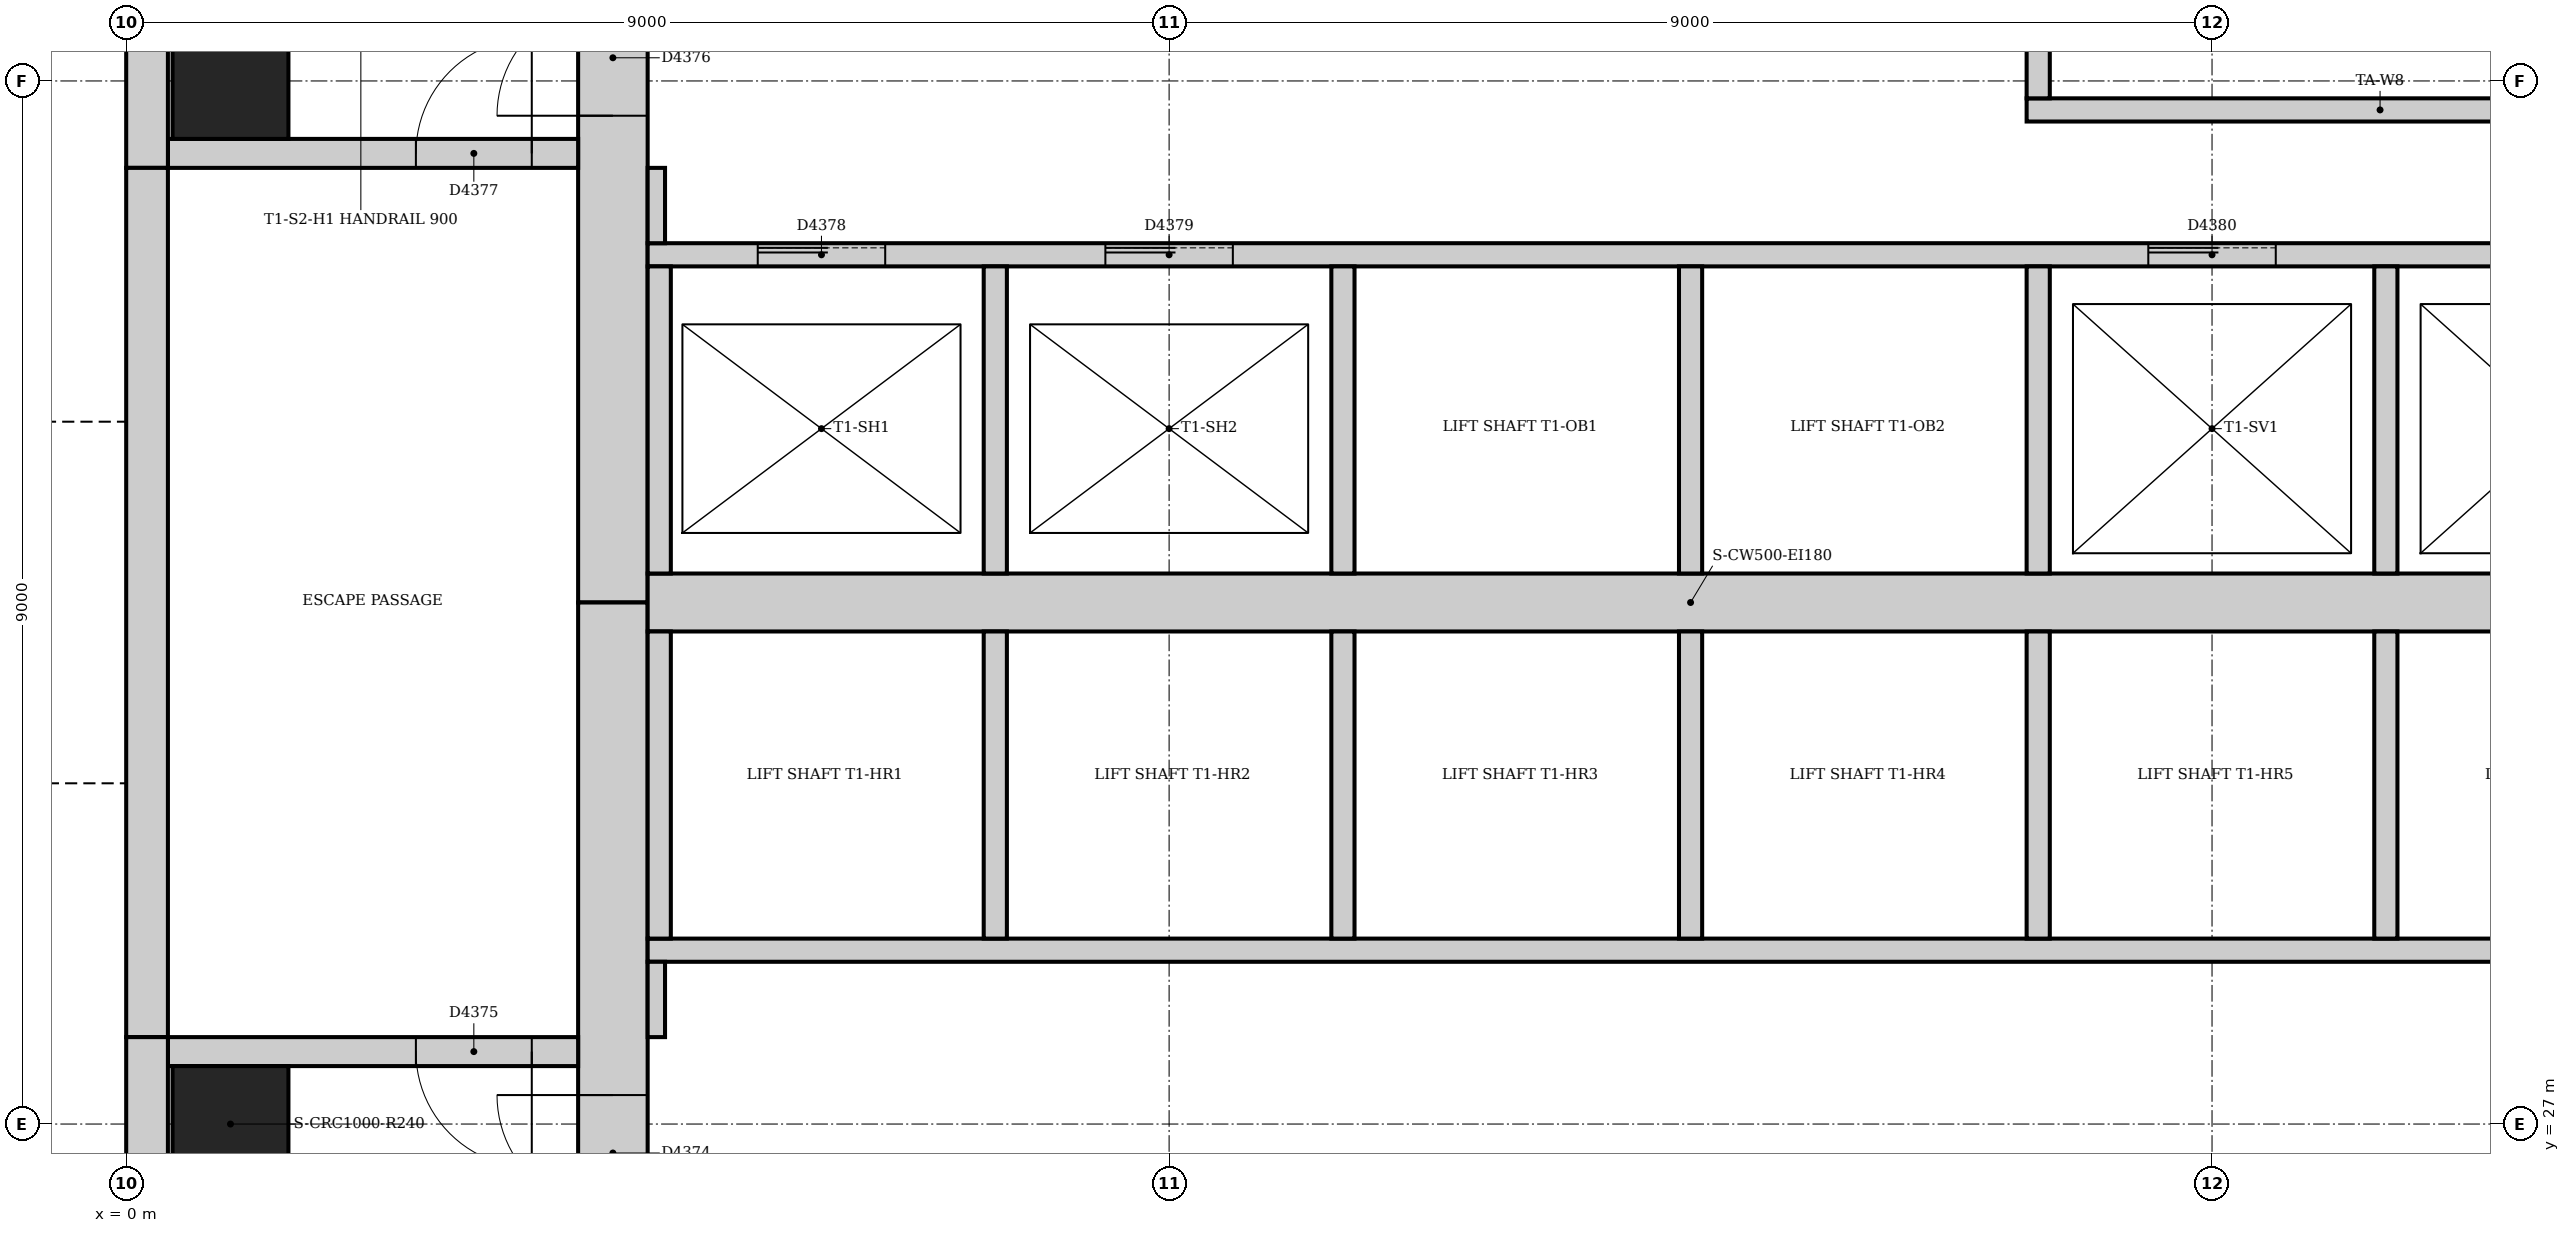
"""IFC4 building model, lengths in metres.
Left out: names, types, materials, properties, quantities, classifications, styles, units other than length and angle.
Written with IfcOpenShell. Run it as: python <this file> out.ifc"""

import sys

from ifc_helpers import new_model, si_unit, direction, frame, frame_2d, origin, origin_2d, place, context, subcontext, project, spatial, rectangle, extrude, element, fill, save


model = new_model("IFC4")
c1 = context("Model", 3, precision=1e-05, world=origin(), true_north=direction((0.0, 1.0)))
c2 = subcontext(c1, "Body", "Model", "MODEL_VIEW")
j1 = project(units=[si_unit("LENGTHUNIT", "METRE"), si_unit("PLANEANGLEUNIT", "RADIAN")], contexts=[c1])
p1 = place(None, origin())
s1 = spatial("IfcSite", under=j1, at=p1, CompositionType="ELEMENT")
p2 = place(p1, origin())
s2 = spatial("IfcBuilding", under=s1, at=p2, CompositionType="ELEMENT")
p3 = place(p2, frame((0.0, 0.0, 144.0)))
s3 = spatial("IfcBuildingStorey", under=s2, at=p3, CompositionType="ELEMENT", Elevation=144.0)
p4 = place(p3, frame((4.2, 42.0, 0.0), z_axis=(0.0, 0.0, 1.0), x_axis=(0.0, -1.0, 0.0)))
e1 = element("IfcWall", 1, at=p4, inside=s3, PredefinedType="SOLIDWALL", context=c2, shape_type="SweptSolid", body=[
    extrude(rectangle(XDim=10.5, YDim=0.6, at=frame_2d((5.25, 0.0))), origin(), (0.0, 0.0, 1.0), 5.0),
])
p5 = place(p4, frame((5.3, 0.0, 0.0)))
e2 = element("IfcOpeningElement", 2, at=p5, cuts=e1, PredefinedType="OPENING", context=c2, shape_type="SweptSolid", body=[
    extrude(rectangle(XDim=1.0, YDim=2.1, at=frame_2d((0.5, 1.05))), frame((0.0, 0.31, 0.0), z_axis=(0.0, -1.0, 0.0), x_axis=(1.0, 0.0, 0.0)), (0.0, 0.0, 1.0), 0.62),
])
p6 = place(p3, frame((4.2, 31.5, 0.0), z_axis=(0.0, 0.0, 1.0), x_axis=(0.0, -1.0, 0.0)))
e3 = element("IfcWall", 3, at=p6, inside=s3, PredefinedType="SOLIDWALL", context=c2, shape_type="SweptSolid", body=[
    extrude(rectangle(XDim=10.5, YDim=0.6, at=frame_2d((5.25, 0.0))), origin(), (0.0, 0.0, 1.0), 5.0),
])
p7 = place(p6, frame((4.25, 0.0, 0.0)))
e4 = element("IfcOpeningElement", 4, at=p7, cuts=e3, PredefinedType="OPENING", context=c2, shape_type="SweptSolid", body=[
    extrude(rectangle(XDim=1.0, YDim=2.1, at=frame_2d((0.5, 1.05))), frame((0.0, 0.31, 0.0), z_axis=(0.0, -1.0, 0.0), x_axis=(1.0, 0.0, 0.0)), (0.0, 0.0, 1.0), 0.62),
])
p8 = place(p3, frame((4.5, 31.5, 0.0), z_axis=(0.0, 0.0, 1.0), x_axis=(1.0, 0.0, 0.0)))
e5 = element("IfcWall", 5, at=p8, inside=s3, PredefinedType="SOLIDWALL", context=c2, shape_type="SweptSolid", body=[
    extrude(rectangle(XDim=18.0, YDim=0.5, at=frame_2d((9.0, 0.0))), origin(), (0.0, 0.0, 1.0), 5.0),
])
p9 = place(p3, frame((3.9, 27.625, 0.0), z_axis=(0.0, 0.0, 1.0), x_axis=(-1.0, 0.0, 0.0)))
e6 = element("IfcWall", 6, at=p9, inside=s3, PredefinedType="SOLIDWALL", context=c2, shape_type="SweptSolid", body=[
    extrude(rectangle(XDim=3.54, YDim=0.25, at=frame_2d((1.77, 0.0))), origin(), (0.0, 0.0, 1.0), 5.0),
])
p10 = place(p9, frame((0.4, 0.0, 0.0)))
e7 = element("IfcOpeningElement", 7, at=p10, cuts=e6, PredefinedType="OPENING", context=c2, shape_type="SweptSolid", body=[
    extrude(rectangle(XDim=1.0, YDim=2.1, at=frame_2d((0.5, 1.05))), frame((0.0, 0.135, 0.0), z_axis=(0.0, -1.0, 0.0), x_axis=(1.0, 0.0, 0.0)), (0.0, 0.0, 1.0), 0.27),
])
p11 = place(p3, frame((0.36, 35.375, 0.0), z_axis=(0.0, 0.0, 1.0), x_axis=(1.0, 0.0, 0.0)))
e8 = element("IfcWall", 8, at=p11, inside=s3, PredefinedType="SOLIDWALL", context=c2, shape_type="SweptSolid", body=[
    extrude(rectangle(XDim=3.54, YDim=0.25, at=frame_2d((1.77, 0.0))), origin(), (0.0, 0.0, 1.0), 5.0),
])
p12 = place(p11, frame((2.14, 0.0, 0.0)))
e9 = element("IfcOpeningElement", 9, at=p12, cuts=e8, PredefinedType="OPENING", context=c2, shape_type="SweptSolid", body=[
    extrude(rectangle(XDim=1.0, YDim=2.1, at=frame_2d((0.5, 1.05))), frame((0.0, 0.135, 0.0), z_axis=(0.0, -1.0, 0.0), x_axis=(1.0, 0.0, 0.0)), (0.0, 0.0, 1.0), 0.27),
])
for number, where, z_axis, x_axis in (
    (10, (0.9, 27.0, 0.0), (0.0, 0.0, 1.0), (1.0, 0.0, 0.0)),
    (11, (0.9, 36.0, 0.0), (0.0, 0.0, 1.0), (1.0, 0.0, 0.0)),
):
    element("IfcColumn", number, at=place(p3, frame(where, z_axis=z_axis, x_axis=x_axis)), inside=s3, PredefinedType="COLUMN", context=c2, shape_type="SweptSolid", body=[
        extrude(rectangle(XDim=1.0, YDim=1.0, at=origin_2d()), origin(), (0.0, 0.0, 1.0), 5.0),
    ])
p13 = place(p3, frame((0.18, 42.0, 0.0), z_axis=(0.0, 0.0, 1.0), x_axis=(0.0, -1.0, 0.0)))
e12 = element("IfcWall", 12, at=p13, inside=s3, PredefinedType="STANDARD", context=c2, shape_type="SweptSolid", body=[
    extrude(rectangle(XDim=6.75, YDim=0.36, at=frame_2d((3.375, 0.0))), origin(), (0.0, 0.0, 1.0), 4.85),
])
p14 = place(p3, frame((0.18, 35.25, 0.0), z_axis=(0.0, 0.0, 1.0), x_axis=(0.0, -1.0, 0.0)))
e13 = element("IfcWall", 13, at=p14, inside=s3, PredefinedType="STANDARD", context=c2, shape_type="SweptSolid", body=[
    extrude(rectangle(XDim=7.5, YDim=0.36, at=frame_2d((3.75, 0.0))), origin(), (0.0, 0.0, 1.0), 4.85),
])
p15 = place(p3, frame((0.18, 27.75, 0.0), z_axis=(0.0, 0.0, 1.0), x_axis=(0.0, -1.0, 0.0)))
e14 = element("IfcWall", 14, at=p15, inside=s3, PredefinedType="STANDARD", context=c2, shape_type="SweptSolid", body=[
    extrude(rectangle(XDim=6.75, YDim=0.36, at=frame_2d((3.375, 0.0))), origin(), (0.0, 0.0, 1.0), 4.85),
])
p16 = place(p3, frame((16.4, 35.75, 0.0), z_axis=(0.0, 0.0, 1.0), x_axis=(1.0, 0.0, 0.0)))
e15 = element("IfcWall", 15, at=p16, inside=s3, PredefinedType="PARTITIONING", context=c2, shape_type="SweptSolid", body=[
    extrude(rectangle(XDim=6.1, YDim=0.2, at=frame_2d((3.05, 0.0))), origin(), (0.0, 0.0, 1.0), 4.85),
])
p17 = place(p3, frame((16.5, 35.85, 0.0), z_axis=(0.0, 0.0, 1.0), x_axis=(0.0, 1.0, 0.0)))
e16 = element("IfcWall", 16, at=p17, inside=s3, PredefinedType="PARTITIONING", context=c2, shape_type="SweptSolid", body=[
    extrude(rectangle(XDim=2.55, YDim=0.2, at=frame_2d((1.275, 0.0))), origin(), (0.0, 0.0, 1.0), 4.85),
])
p18 = place(p3, frame((4.5, 28.5, 0.0), z_axis=(0.0, 0.0, 1.0), x_axis=(1.0, 0.0, 0.0)))
e17 = element("IfcWall", 17, at=p18, inside=s3, PredefinedType="PARTITIONING", context=c2, shape_type="SweptSolid", body=[
    extrude(rectangle(XDim=18.0, YDim=0.2, at=frame_2d((9.0, 0.0))), origin(), (0.0, 0.0, 1.0), 4.85),
])
p19 = place(p3, frame((4.5, 34.5, 0.0), z_axis=(0.0, 0.0, 1.0), x_axis=(1.0, 0.0, 0.0)))
e18 = element("IfcWall", 18, at=p19, inside=s3, PredefinedType="PARTITIONING", context=c2, shape_type="SweptSolid", body=[
    extrude(rectangle(XDim=18.0, YDim=0.2, at=frame_2d((9.0, 0.0))), origin(), (0.0, 0.0, 1.0), 4.85),
])
p20 = place(p19, frame((0.95, 0.0, 0.0)))
e19 = element("IfcOpeningElement", 19, at=p20, cuts=e18, PredefinedType="OPENING", context=c2, shape_type="SweptSolid", body=[
    extrude(rectangle(XDim=1.1, YDim=2.1, at=frame_2d((0.55, 1.05))), frame((0.0, 0.11, 0.0), z_axis=(0.0, -1.0, 0.0), x_axis=(1.0, 0.0, 0.0)), (0.0, 0.0, 1.0), 0.22),
])
p21 = place(p19, frame((3.95, 0.0, 0.0)))
e20 = element("IfcOpeningElement", 20, at=p21, cuts=e18, PredefinedType="OPENING", context=c2, shape_type="SweptSolid", body=[
    extrude(rectangle(XDim=1.1, YDim=2.1, at=frame_2d((0.55, 1.05))), frame((0.0, 0.11, 0.0), z_axis=(0.0, -1.0, 0.0), x_axis=(1.0, 0.0, 0.0)), (0.0, 0.0, 1.0), 0.22),
])
p22 = place(p19, frame((12.95, 0.0, 0.0)))
e21 = element("IfcOpeningElement", 21, at=p22, cuts=e18, PredefinedType="OPENING", context=c2, shape_type="SweptSolid", body=[
    extrude(rectangle(XDim=1.1, YDim=2.1, at=frame_2d((0.55, 1.05))), frame((0.0, 0.11, 0.0), z_axis=(0.0, -1.0, 0.0), x_axis=(1.0, 0.0, 0.0)), (0.0, 0.0, 1.0), 0.22),
])
p23 = place(p19, frame((15.95, 0.0, 0.0)))
e22 = element("IfcOpeningElement", 22, at=p23, cuts=e18, PredefinedType="OPENING", context=c2, shape_type="SweptSolid", body=[
    extrude(rectangle(XDim=1.1, YDim=2.1, at=frame_2d((0.55, 1.05))), frame((0.0, 0.11, 0.0), z_axis=(0.0, -1.0, 0.0), x_axis=(1.0, 0.0, 0.0)), (0.0, 0.0, 1.0), 0.22),
])
for number, where, z_axis, x_axis in (
    (23, (4.6, 31.75, 0.0), (0.0, 0.0, 1.0), (0.0, 1.0, 0.0)),
    (24, (4.6, 28.6, 0.0), (0.0, 0.0, 1.0), (0.0, 1.0, 0.0)),
    (25, (7.5, 28.6, 0.0), (0.0, 0.0, 1.0), (0.0, 1.0, 0.0)),
    (26, (7.5, 31.75, 0.0), (0.0, 0.0, 1.0), (0.0, 1.0, 0.0)),
    (27, (10.5, 28.6, 0.0), (0.0, 0.0, 1.0), (0.0, 1.0, 0.0)),
    (28, (10.5, 31.75, 0.0), (0.0, 0.0, 1.0), (0.0, 1.0, 0.0)),
    (29, (13.5, 28.6, 0.0), (0.0, 0.0, 1.0), (0.0, 1.0, 0.0)),
    (30, (13.5, 31.75, 0.0), (0.0, 0.0, 1.0), (0.0, 1.0, 0.0)),
    (31, (16.5, 28.6, 0.0), (0.0, 0.0, 1.0), (0.0, 1.0, 0.0)),
    (32, (16.5, 31.75, 0.0), (0.0, 0.0, 1.0), (0.0, 1.0, 0.0)),
    (33, (19.5, 28.6, 0.0), (0.0, 0.0, 1.0), (0.0, 1.0, 0.0)),
    (34, (19.5, 31.75, 0.0), (0.0, 0.0, 1.0), (0.0, 1.0, 0.0)),
):
    element("IfcWall", number, at=place(p3, frame(where, z_axis=z_axis, x_axis=x_axis)), inside=s3, PredefinedType="PARTITIONING", context=c2, shape_type="SweptSolid", body=[
        extrude(rectangle(XDim=2.65, YDim=0.2, at=frame_2d((1.325, 0.0))), origin(), (0.0, 0.0, 1.0), 4.85),
    ])
for number, where, z_axis, x_axis in (
    (35, (4.575, 27.75, 0.0), (0.0, 0.0, 1.0), (0.0, 1.0, 0.0)),
    (36, (4.575, 34.6, 0.0), (0.0, 0.0, 1.0), (0.0, 1.0, 0.0)),
):
    element("IfcWall", number, at=place(p3, frame(where, z_axis=z_axis, x_axis=x_axis)), inside=s3, PredefinedType="PARTITIONING", context=c2, shape_type="SweptSolid", body=[
        extrude(rectangle(XDim=0.65, YDim=0.15, at=frame_2d((0.325, 0.0))), origin(), (0.0, 0.0, 1.0), 4.85),
    ])
p24 = place(p7, frame((1.0, 0.0, 0.0), z_axis=(0.0, 0.0, 1.0), x_axis=(-1.0, 0.0, 0.0)))
e37 = element("IfcDoor", 37, at=p24, inside=s3, OperationType="SINGLE_SWING_RIGHT", PredefinedType="DOOR", context=c2, shape_type="SweptSolid", body=[
    extrude(rectangle(XDim=1.0, YDim=2.1, at=frame_2d((0.5, 1.05))), frame((0.0, 0.025, 0.0), z_axis=(0.0, -1.0, 0.0), x_axis=(1.0, 0.0, 0.0)), (0.0, 0.0, 1.0), 0.05),
])
fill(e4, e37)
p25 = place(p10, origin())
e38 = element("IfcDoor", 38, at=p25, inside=s3, OperationType="SINGLE_SWING_LEFT", PredefinedType="DOOR", context=c2, shape_type="SweptSolid", body=[
    extrude(rectangle(XDim=1.0, YDim=2.1, at=frame_2d((0.5, 1.05))), frame((0.0, 0.025, 0.0), z_axis=(0.0, -1.0, 0.0), x_axis=(1.0, 0.0, 0.0)), (0.0, 0.0, 1.0), 0.05),
])
fill(e7, e38)
p26 = place(p5, frame((1.0, 0.0, 0.0), z_axis=(0.0, 0.0, 1.0), x_axis=(-1.0, 0.0, 0.0)))
e39 = element("IfcDoor", 39, at=p26, inside=s3, OperationType="SINGLE_SWING_LEFT", PredefinedType="DOOR", context=c2, shape_type="SweptSolid", body=[
    extrude(rectangle(XDim=1.0, YDim=2.1, at=frame_2d((0.5, 1.05))), frame((0.0, 0.025, 0.0), z_axis=(0.0, -1.0, 0.0), x_axis=(1.0, 0.0, 0.0)), (0.0, 0.0, 1.0), 0.05),
])
fill(e2, e39)
p27 = place(p12, origin())
e40 = element("IfcDoor", 40, at=p27, inside=s3, OperationType="SINGLE_SWING_RIGHT", PredefinedType="DOOR", context=c2, shape_type="SweptSolid", body=[
    extrude(rectangle(XDim=1.0, YDim=2.1, at=frame_2d((0.5, 1.05))), frame((0.0, 0.025, 0.0), z_axis=(0.0, -1.0, 0.0), x_axis=(1.0, 0.0, 0.0)), (0.0, 0.0, 1.0), 0.05),
])
fill(e9, e40)
p28 = place(p20, origin())
e41 = element("IfcDoor", 41, at=p28, inside=s3, OperationType="SLIDING_TO_LEFT", PredefinedType="DOOR", context=c2, shape_type="SweptSolid", body=[
    extrude(rectangle(XDim=1.1, YDim=2.1, at=frame_2d((0.55, 1.05))), frame((0.0, 0.025, 0.0), z_axis=(0.0, -1.0, 0.0), x_axis=(1.0, 0.0, 0.0)), (0.0, 0.0, 1.0), 0.05),
])
fill(e19, e41)
p29 = place(p21, origin())
e42 = element("IfcDoor", 42, at=p29, inside=s3, OperationType="SLIDING_TO_LEFT", PredefinedType="DOOR", context=c2, shape_type="SweptSolid", body=[
    extrude(rectangle(XDim=1.1, YDim=2.1, at=frame_2d((0.55, 1.05))), frame((0.0, 0.025, 0.0), z_axis=(0.0, -1.0, 0.0), x_axis=(1.0, 0.0, 0.0)), (0.0, 0.0, 1.0), 0.05),
])
fill(e20, e42)
p30 = place(p22, origin())
e43 = element("IfcDoor", 43, at=p30, inside=s3, OperationType="SLIDING_TO_LEFT", PredefinedType="DOOR", context=c2, shape_type="SweptSolid", body=[
    extrude(rectangle(XDim=1.1, YDim=2.1, at=frame_2d((0.55, 1.05))), frame((0.0, 0.025, 0.0), z_axis=(0.0, -1.0, 0.0), x_axis=(1.0, 0.0, 0.0)), (0.0, 0.0, 1.0), 0.05),
])
fill(e21, e43)
save(model, sys.argv[1])
